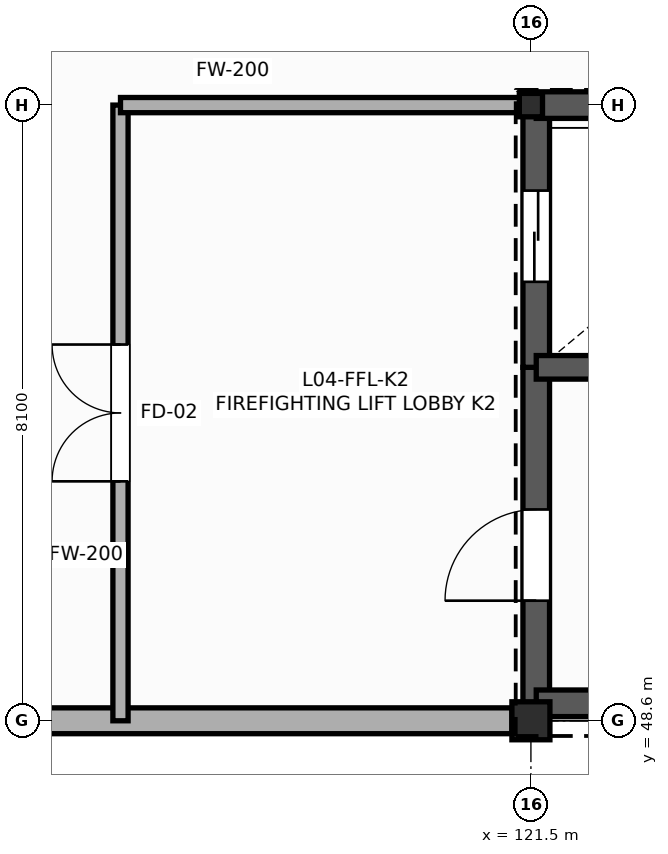
"""IFC4 building model, lengths in metres.
Left out: names, types, materials, properties, quantities, classifications, styles, units other than length and angle.
Written with IfcOpenShell. Run it as: python <this file> out.ifc"""

import sys

from ifc_helpers import new_model, si_unit, direction, frame, frame_2d, origin, origin_2d, place, context, subcontext, project, spatial, rectangle, i_section, extrude, element, fill, save


model = new_model("IFC4")
c1 = context("Model", 3, precision=1e-05, world=origin(), true_north=direction((0.0, 1.0)))
c2 = subcontext(c1, "Body", "Model", "MODEL_VIEW")
j1 = project(units=[si_unit("LENGTHUNIT", "METRE"), si_unit("PLANEANGLEUNIT", "RADIAN")], contexts=[c1])
p1 = place(None, origin())
s1 = spatial("IfcSite", under=j1, at=p1, CompositionType="ELEMENT")
p2 = place(p1, origin())
s2 = spatial("IfcBuilding", under=s1, at=p2, CompositionType="ELEMENT")
p3 = place(p2, frame((0.0, 0.0, 19.2)))
s3 = spatial("IfcBuildingStorey", under=s2, at=p3, CompositionType="ELEMENT", Elevation=19.2)
p4 = place(p3, frame((121.5, 48.6, 0.0), z_axis=(0.0, 0.0, 1.0), x_axis=(1.0, 0.0, 0.0)))
e1 = element("IfcColumn", 1, at=p4, inside=s3, PredefinedType="COLUMN", context=c2, shape_type="SweptSolid", body=[
    extrude(rectangle(XDim=0.5, YDim=0.5, at=origin_2d()), origin(), (0.0, 0.0, 1.0), 4.2),
])
p5 = place(p3, frame((121.5, 56.7, 0.0), z_axis=(0.0, 0.0, 1.0), x_axis=(1.0, 0.0, 0.0)))
e2 = element("IfcColumn", 2, at=p5, inside=s3, PredefinedType="COLUMN", context=c2, shape_type="SweptSolid", body=[
    extrude(i_section(OverallWidth=0.305, OverallDepth=0.308, WebThickness=0.01, FlangeThickness=0.015, FilletRadius=0.015, at=origin_2d()), origin(), (0.0, 0.0, 1.0), 4.2),
])
p6 = place(p3, frame((113.65, 48.6, 0.0), z_axis=(0.0, 0.0, 1.0), x_axis=(1.0, 0.0, 0.0)))
e3 = element("IfcWall", 3, at=p6, inside=s3, PredefinedType="SOLIDWALL", context=c2, shape_type="SweptSolid", body=[
    extrude(rectangle(XDim=7.6, YDim=0.34, at=frame_2d((3.8, 0.0))), origin(), (0.0, 0.0, 1.0), 3.485),
])
p7 = place(p3, frame((121.57, 48.83, 0.0), z_axis=(0.0, 0.0, 1.0), x_axis=(0.0, 1.0, 0.0)))
e4 = element("IfcWall", 4, at=p7, inside=s3, PredefinedType="SHEAR", context=c2, shape_type="SweptSolid", body=[
    extrude(rectangle(XDim=4.42, YDim=0.35, at=frame_2d((2.21, 0.0))), origin(), (0.0, 0.0, 1.0), 4.2),
])
p8 = place(p7, frame((1.35, 0.0, 0.0)))
e5 = element("IfcOpeningElement", 5, at=p8, cuts=e4, PredefinedType="OPENING", context=c2, shape_type="SweptSolid", body=[
    extrude(rectangle(XDim=1.2, YDim=2.25, at=frame_2d((0.6, 1.125))), frame((0.0, 0.185, 0.0), z_axis=(0.0, -1.0, 0.0), x_axis=(1.0, 0.0, 0.0)), (0.0, 0.0, 1.0), 0.37),
])
p9 = place(p3, frame((121.57, 53.25, 0.0), z_axis=(0.0, 0.0, 1.0), x_axis=(0.0, 1.0, 0.0)))
e6 = element("IfcWall", 6, at=p9, inside=s3, PredefinedType="SHEAR", context=c2, shape_type="SweptSolid", body=[
    extrude(rectangle(XDim=3.45, YDim=0.35, at=frame_2d((1.725, 0.0))), origin(), (0.0, 0.0, 1.0), 4.2),
])
p10 = place(p9, frame((1.125, 0.0, 0.0)))
e7 = element("IfcOpeningElement", 7, at=p10, cuts=e6, PredefinedType="OPENING", context=c2, shape_type="SweptSolid", body=[
    extrude(rectangle(XDim=1.2, YDim=2.2, at=frame_2d((0.6, 1.1))), frame((0.0, 0.185, 0.0), z_axis=(0.0, -1.0, 0.0), x_axis=(1.0, 0.0, 0.0)), (0.0, 0.0, 1.0), 0.37),
])
p11 = place(p3, frame((121.57, 56.7, 0.0), z_axis=(0.0, 0.0, 1.0), x_axis=(1.0, 0.0, 0.0)))
e8 = element("IfcWall", 8, at=p11, inside=s3, PredefinedType="SHEAR", context=c2, shape_type="SweptSolid", body=[
    extrude(rectangle(XDim=3.98, YDim=0.35, at=frame_2d((1.99, 0.0))), origin(), (0.0, 0.0, 1.0), 4.2),
])
p12 = place(p3, frame((129.63, 48.83, 0.0), z_axis=(0.0, 0.0, 1.0), x_axis=(-1.0, 0.0, 0.0)))
e9 = element("IfcWall", 9, at=p12, inside=s3, PredefinedType="SHEAR", context=c2, shape_type="SweptSolid", body=[
    extrude(rectangle(XDim=8.06, YDim=0.35, at=frame_2d((4.03, 0.0))), origin(), (0.0, 0.0, 1.0), 4.2),
])
p13 = place(p3, frame((121.57, 53.25, 0.0), z_axis=(0.0, 0.0, 1.0), x_axis=(1.0, 0.0, 0.0)))
e10 = element("IfcWall", 10, at=p13, inside=s3, PredefinedType="SHEAR", context=c2, shape_type="SweptSolid", body=[
    extrude(rectangle(XDim=8.06, YDim=0.31, at=frame_2d((4.03, 0.0))), origin(), (0.0, 0.0, 1.0), 4.2),
])
p14 = place(p3, frame((116.1, 48.6, 0.0), z_axis=(0.0, 0.0, 1.0), x_axis=(0.0, 1.0, 0.0)))
e11 = element("IfcWall", 11, at=p14, inside=s3, PredefinedType="PARTITIONING", context=c2, shape_type="SweptSolid", body=[
    extrude(rectangle(XDim=8.1, YDim=0.2, at=frame_2d((4.05, 0.0))), origin(), (0.0, 0.0, 1.0), 3.9),
])
p15 = place(p14, frame((3.15, 0.0, 0.0)))
e12 = element("IfcOpeningElement", 12, at=p15, cuts=e11, PredefinedType="OPENING", context=c2, shape_type="SweptSolid", body=[
    extrude(rectangle(XDim=1.8, YDim=2.25, at=frame_2d((0.9, 1.125))), frame((0.0, 0.11, 0.0), z_axis=(0.0, -1.0, 0.0), x_axis=(1.0, 0.0, 0.0)), (0.0, 0.0, 1.0), 0.22),
])
p16 = place(p3, frame((116.1, 56.7, 0.0), z_axis=(0.0, 0.0, 1.0), x_axis=(1.0, 0.0, 0.0)))
e13 = element("IfcWall", 13, at=p16, inside=s3, PredefinedType="PARTITIONING", context=c2, shape_type="SweptSolid", body=[
    extrude(rectangle(XDim=5.47, YDim=0.2, at=frame_2d((2.735, 0.0))), origin(), (0.0, 0.0, 1.0), 3.346),
])
p17 = place(p8, origin())
e14 = element("IfcDoor", 14, at=p17, inside=s3, OperationType="SINGLE_SWING_LEFT", PredefinedType="DOOR", context=c2, shape_type="SweptSolid", body=[
    extrude(rectangle(XDim=1.2, YDim=2.25, at=frame_2d((0.6, 1.125))), frame((0.0, 0.025, 0.0), z_axis=(0.0, -1.0, 0.0), x_axis=(1.0, 0.0, 0.0)), (0.0, 0.0, 1.0), 0.05),
])
fill(e5, e14)
p18 = place(p10, origin())
e15 = element("IfcDoor", 15, at=p18, inside=s3, OperationType="SLIDING_TO_LEFT", PredefinedType="DOOR", context=c2, shape_type="SweptSolid", body=[
    extrude(rectangle(XDim=1.2, YDim=2.2, at=frame_2d((0.6, 1.1))), frame((0.0, 0.025, 0.0), z_axis=(0.0, -1.0, 0.0), x_axis=(1.0, 0.0, 0.0)), (0.0, 0.0, 1.0), 0.05),
])
fill(e7, e15)
p19 = place(p15, origin())
e16 = element("IfcDoor", 16, at=p19, inside=s3, OperationType="DOUBLE_DOOR_SINGLE_SWING", PredefinedType="DOOR", context=c2, shape_type="SweptSolid", body=[
    extrude(rectangle(XDim=1.8, YDim=2.25, at=frame_2d((0.9, 1.125))), frame((0.0, 0.025, 0.0), z_axis=(0.0, -1.0, 0.0), x_axis=(1.0, 0.0, 0.0)), (0.0, 0.0, 1.0), 0.05),
])
fill(e12, e16)
save(model, sys.argv[1])
